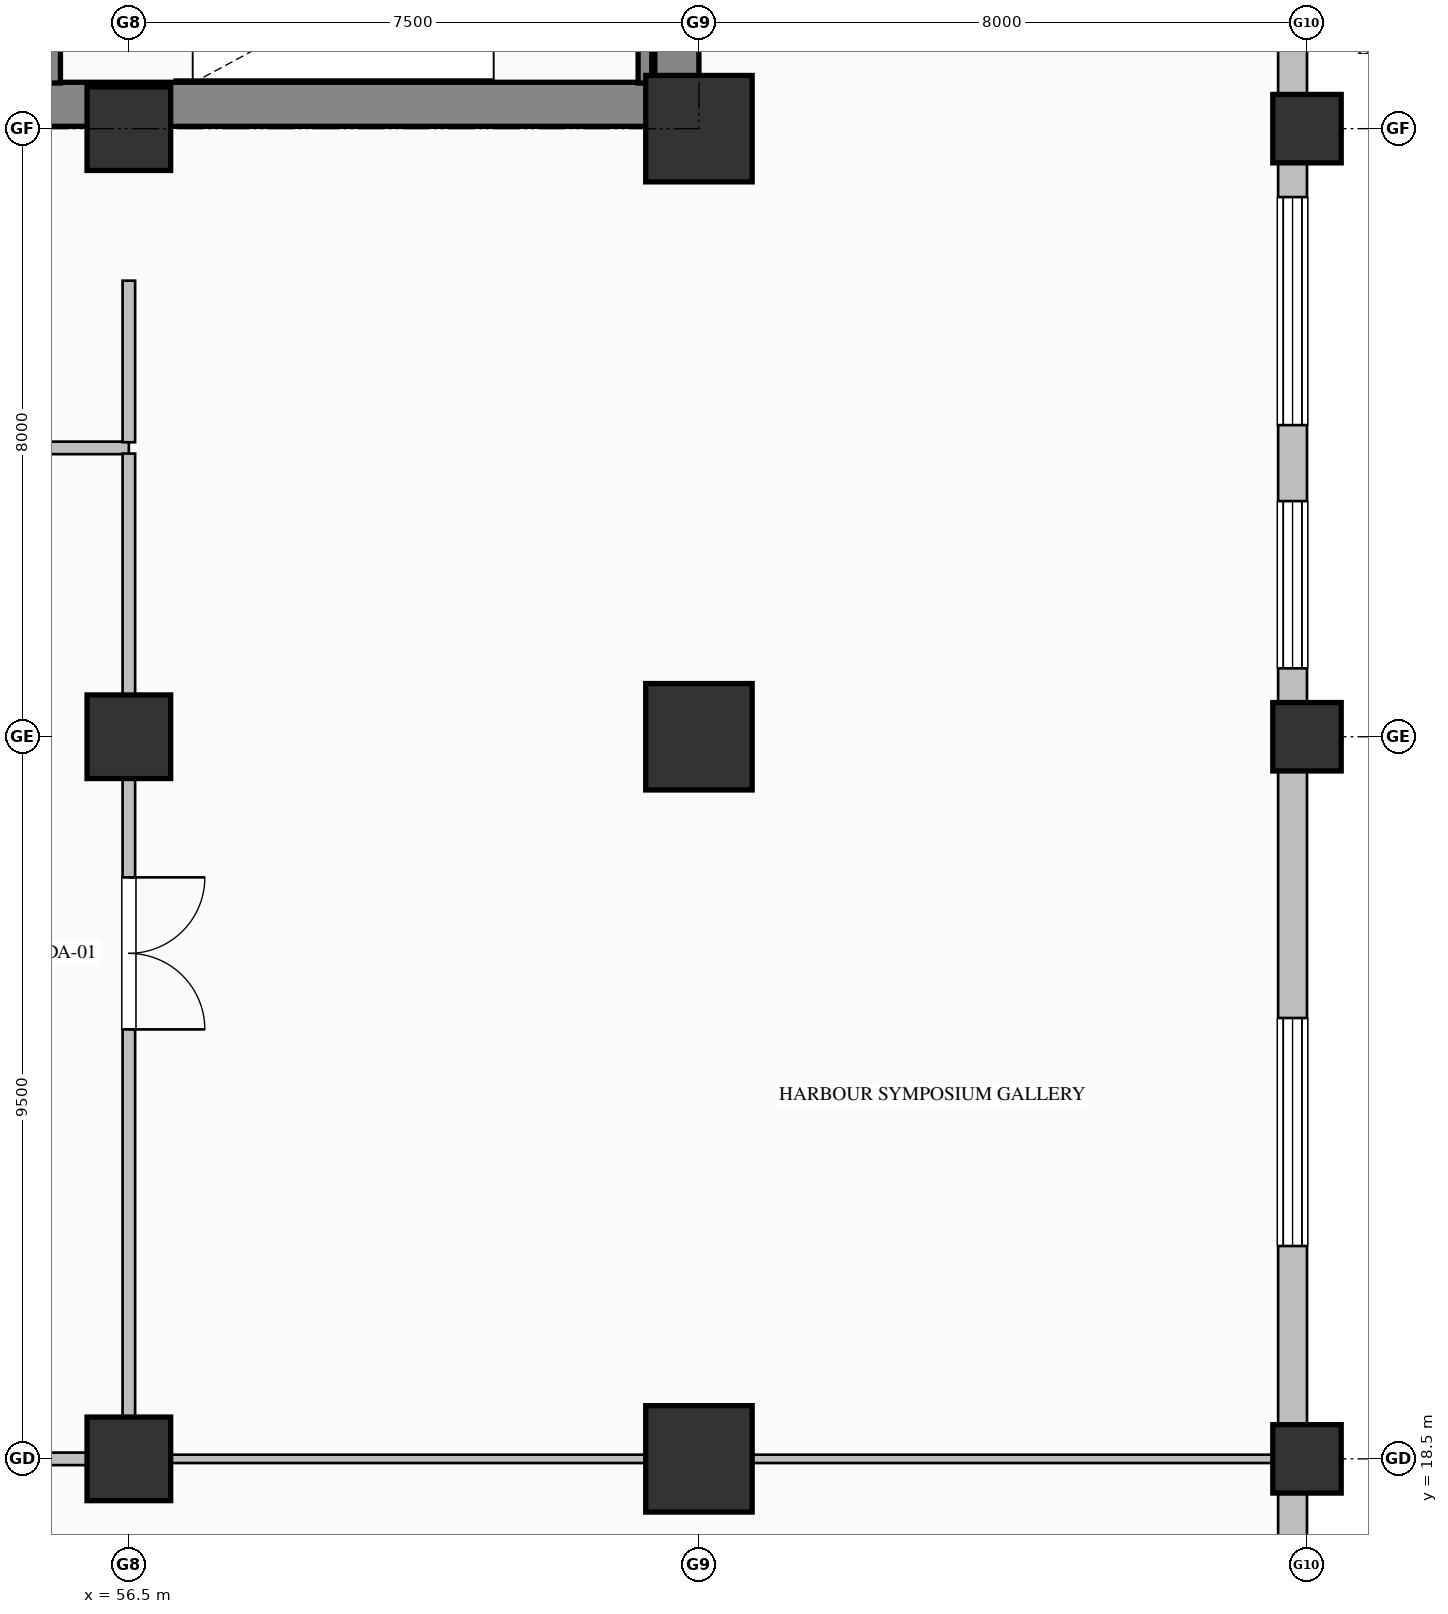
"""IFC4 building model, lengths in metres.
Left out: names, types, materials, properties, quantities, classifications, styles, units other than length and angle.
Written with IfcOpenShell. Run it as: python <this file> out.ifc"""

import sys

from ifc_helpers import new_model, si_unit, direction, frame, frame_2d, origin, origin_2d, place, context, subcontext, project, spatial, rectangle, hollow_rectangle, extrude, element, fill, save


model = new_model("IFC4")
c1 = context("Model", 3, precision=1e-05, world=origin(), true_north=direction((0.0, 1.0)))
c2 = subcontext(c1, "Body", "Model", "MODEL_VIEW")
j1 = project(units=[si_unit("LENGTHUNIT", "METRE"), si_unit("PLANEANGLEUNIT", "RADIAN")], contexts=[c1])
p1 = place(None, origin())
s1 = spatial("IfcSite", under=j1, at=p1, CompositionType="ELEMENT")
p2 = place(p1, origin())
s2 = spatial("IfcBuilding", under=s1, at=p2, CompositionType="ELEMENT")
p3 = place(p2, frame((0.0, 0.0, 11.4)))
s3 = spatial("IfcBuildingStorey", under=s2, at=p3, CompositionType="ELEMENT", Elevation=11.4)
p4 = place(p3, frame((63.71, 36.32, 0.0), z_axis=(0.0, 0.0, 1.0), x_axis=(0.0, 1.0, 0.0)))
e1 = element("IfcWall", 1, at=p4, inside=s3, PredefinedType="SHEAR", context=c2, shape_type="SweptSolid", body=[
    extrude(rectangle(XDim=15.1, YDim=0.58, at=frame_2d((7.55, 0.0))), origin(), (0.0, 0.0, 1.0), 5.55),
])
p5 = place(p3, frame((54.4, 36.32, 0.0), z_axis=(0.0, 0.0, 1.0), x_axis=(1.0, 0.0, 0.0)))
e2 = element("IfcWall", 2, at=p5, inside=s3, PredefinedType="SHEAR", context=c2, shape_type="SweptSolid", body=[
    extrude(rectangle(XDim=9.6, YDim=0.58, at=frame_2d((4.8, 0.0))), origin(), (0.0, 0.0, 1.0), 6.0),
])
for number, where, z_axis, x_axis in (
    (3, (56.5, 18.5, 0.0), (0.0, 0.0, 1.0), (1.0, 0.0, 0.0)),
    (4, (56.5, 28.0, 0.0), (0.0, 0.0, 1.0), (1.0, 0.0, 0.0)),
    (5, (56.5, 36.0, 0.0), (0.0, 0.0, 1.0), (1.0, 0.0, 0.0)),
):
    element("IfcColumn", number, at=place(p3, frame(where, z_axis=z_axis, x_axis=x_axis)), inside=s3, PredefinedType="COLUMN", context=c2, shape_type="SweptSolid", body=[
        extrude(rectangle(XDim=1.1, YDim=1.1, at=origin_2d()), origin(), (0.0, 0.0, 1.0), 6.0),
    ])
for number, where, z_axis, x_axis in (
    (6, (64.0, 18.5, 0.0), (0.0, 0.0, 1.0), (1.0, 0.0, 0.0)),
    (7, (64.0, 28.0, 0.0), (0.0, 0.0, 1.0), (1.0, 0.0, 0.0)),
    (8, (64.0, 36.0, 0.0), (0.0, 0.0, 1.0), (1.0, 0.0, 0.0)),
):
    element("IfcColumn", number, at=place(p3, frame(where, z_axis=z_axis, x_axis=x_axis)), inside=s3, PredefinedType="COLUMN", context=c2, shape_type="SweptSolid", body=[
        extrude(hollow_rectangle(XDim=1.4, YDim=1.4, WallThickness=0.05, at=origin_2d()), origin(), (0.0, 0.0, 1.0), 6.0),
    ])
for number, where, z_axis, x_axis in (
    (9, (72.0, 18.5, 0.0), (0.0, 0.0, 1.0), (1.0, 0.0, 0.0)),
    (10, (72.0, 28.0, 0.0), (0.0, 0.0, 1.0), (1.0, 0.0, 0.0)),
    (11, (72.0, 36.0, 0.0), (0.0, 0.0, 1.0), (1.0, 0.0, 0.0)),
):
    element("IfcColumn", number, at=place(p3, frame(where, z_axis=z_axis, x_axis=x_axis)), inside=s3, PredefinedType="PILASTER", context=c2, shape_type="SweptSolid", body=[
        extrude(rectangle(XDim=0.9, YDim=0.9, at=origin_2d()), origin(), (0.0, 0.0, 1.0), 6.0),
    ])
p6 = place(p3, frame((71.81, 48.0, 0.0), z_axis=(0.0, 0.0, 1.0), x_axis=(0.0, -1.0, 0.0)))
e12 = element("IfcWall", 12, at=p6, inside=s3, PredefinedType="SOLIDWALL", context=c2, shape_type="SweptSolid", body=[
    extrude(rectangle(XDim=44.0, YDim=0.38, at=frame_2d((22.0, 0.0))), origin(), (0.0, 0.0, 1.0), 5.05),
])
p7 = place(p6, frame((6.1, 0.0, 0.9)))
e13 = element("IfcOpeningElement", 13, at=p7, cuts=e12, PredefinedType="OPENING", context=c2, shape_type="SweptSolid", body=[
    extrude(rectangle(XDim=2.2, YDim=2.65, at=frame_2d((1.1, 1.325))), frame((0.0, 0.2, 0.0), z_axis=(0.0, -1.0, 0.0), x_axis=(1.0, 0.0, 0.0)), (0.0, 0.0, 1.0), 0.4),
])
p8 = place(p6, frame((12.9, 0.0, 0.85)))
e14 = element("IfcOpeningElement", 14, at=p8, cuts=e12, PredefinedType="OPENING", context=c2, shape_type="SweptSolid", body=[
    extrude(rectangle(XDim=3.0, YDim=3.2, at=frame_2d((1.5, 1.6))), frame((0.0, 0.2, 0.0), z_axis=(0.0, -1.0, 0.0), x_axis=(1.0, 0.0, 0.0)), (0.0, 0.0, 1.0), 0.4),
])
p9 = place(p6, frame((16.9, 0.0, 0.9)))
e15 = element("IfcOpeningElement", 15, at=p9, cuts=e12, PredefinedType="OPENING", context=c2, shape_type="SweptSolid", body=[
    extrude(rectangle(XDim=2.2, YDim=2.65, at=frame_2d((1.1, 1.325))), frame((0.0, 0.2, 0.0), z_axis=(0.0, -1.0, 0.0), x_axis=(1.0, 0.0, 0.0)), (0.0, 0.0, 1.0), 0.4),
])
p10 = place(p6, frame((23.7, 0.0, 0.85)))
e16 = element("IfcOpeningElement", 16, at=p10, cuts=e12, PredefinedType="OPENING", context=c2, shape_type="SweptSolid", body=[
    extrude(rectangle(XDim=3.0, YDim=3.2, at=frame_2d((1.5, 1.6))), frame((0.0, 0.2, 0.0), z_axis=(0.0, -1.0, 0.0), x_axis=(1.0, 0.0, 0.0)), (0.0, 0.0, 1.0), 0.4),
])
p11 = place(p6, frame((31.1, 0.0, 0.85)))
e17 = element("IfcOpeningElement", 17, at=p11, cuts=e12, PredefinedType="OPENING", context=c2, shape_type="SweptSolid", body=[
    extrude(rectangle(XDim=2.6, YDim=3.1, at=frame_2d((1.3, 1.55))), frame((0.0, 0.2, 0.0), z_axis=(0.0, -1.0, 0.0), x_axis=(1.0, 0.0, 0.0)), (0.0, 0.0, 1.0), 0.4),
])
p12 = place(p6, frame((38.5, 0.0, 0.9)))
e18 = element("IfcOpeningElement", 18, at=p12, cuts=e12, PredefinedType="OPENING", context=c2, shape_type="SweptSolid", body=[
    extrude(rectangle(XDim=2.2, YDim=2.65, at=frame_2d((1.1, 1.325))), frame((0.0, 0.2, 0.0), z_axis=(0.0, -1.0, 0.0), x_axis=(1.0, 0.0, 0.0)), (0.0, 0.0, 1.0), 0.4),
])
p13 = place(p3, frame((55.48, 39.75, 0.0), z_axis=(0.0, 0.0, 1.0), x_axis=(0.0, -1.0, 0.0)))
e19 = element("IfcWall", 19, at=p13, inside=s3, PredefinedType="SOLIDWALL", context=c2, shape_type="SweptSolid", body=[
    extrude(rectangle(XDim=3.15, YDim=0.24, at=frame_2d((1.575, 0.0))), origin(), (0.0, 0.0, 1.0), 6.0),
])
p14 = place(p13, frame((1.0, 0.0, 0.0)))
e20 = element("IfcOpeningElement", 20, at=p14, cuts=e19, PredefinedType="OPENING", context=c2, shape_type="SweptSolid", body=[
    extrude(rectangle(XDim=1.15, YDim=2.2, at=frame_2d((0.575, 1.1))), frame((0.0, 0.13, 0.0), z_axis=(0.0, -1.0, 0.0), x_axis=(1.0, 0.0, 0.0)), (0.0, 0.0, 1.0), 0.26),
])
p15 = place(p3, frame((63.29, 36.6, 0.0), z_axis=(0.0, 0.0, 1.0), x_axis=(0.0, 1.0, 0.0)))
e21 = element("IfcWall", 21, at=p15, inside=s3, PredefinedType="SOLIDWALL", context=c2, shape_type="SweptSolid", body=[
    extrude(rectangle(XDim=3.15, YDim=0.18, at=frame_2d((1.575, 0.0))), origin(), (0.0, 0.0, 1.0), 6.0),
])
p16 = place(p3, frame((56.5, 31.8, 0.0), z_axis=(0.0, 0.0, 1.0), x_axis=(-1.0, 0.0, 0.0)))
e22 = element("IfcWall", 22, at=p16, inside=s3, PredefinedType="PARTITIONING", context=c2, shape_type="SweptSolid", body=[
    extrude(rectangle(XDim=24.0, YDim=0.165, at=frame_2d((12.0, 0.0))), origin(), (0.0, 0.0, 1.0), 5.55),
])
p17 = place(p16, frame((11.475, 0.0, 0.0)))
e23 = element("IfcOpeningElement", 23, at=p17, cuts=e22, PredefinedType="OPENING", context=c2, shape_type="SweptSolid", body=[
    extrude(rectangle(XDim=1.05, YDim=2.15, at=frame_2d((0.525, 1.075))), frame((0.0, 0.093, 0.0), z_axis=(0.0, -1.0, 0.0), x_axis=(1.0, 0.0, 0.0)), (0.0, 0.0, 1.0), 0.185),
])
p18 = place(p3, frame((56.5, 34.0, 0.0), z_axis=(0.0, 0.0, 1.0), x_axis=(0.0, -1.0, 0.0)))
e24 = element("IfcWall", 24, at=p18, inside=s3, PredefinedType="PARTITIONING", context=c2, shape_type="SweptSolid", body=[
    extrude(rectangle(XDim=2.125, YDim=0.165, at=frame_2d((1.063, 0.0))), origin(), (0.0, 0.0, 1.0), 4.642),
])
p19 = place(p3, frame((56.5, 31.726, 0.0), z_axis=(0.0, 0.0, 1.0), x_axis=(0.0, -1.0, 0.0)))
e25 = element("IfcWall", 25, at=p19, inside=s3, PredefinedType="PARTITIONING", context=c2, shape_type="SweptSolid", body=[
    extrude(rectangle(XDim=13.151, YDim=0.165, at=frame_2d((6.576, 0.0))), origin(), (0.0, 0.0, 1.0), 4.642),
])
p20 = place(p19, frame((5.575, 0.0, 0.0)))
e26 = element("IfcOpeningElement", 26, at=p20, cuts=e25, PredefinedType="OPENING", context=c2, shape_type="SweptSolid", body=[
    extrude(rectangle(XDim=2.0, YDim=2.4, at=frame_2d((1.0, 1.2))), frame((0.0, 0.093, 0.0), z_axis=(0.0, -1.0, 0.0), x_axis=(1.0, 0.0, 0.0)), (0.0, 0.0, 1.0), 0.185),
])
p21 = place(p3, frame((56.5, 18.5, 0.0), z_axis=(0.0, 0.0, 1.0), x_axis=(-1.0, 0.0, 0.0)))
e27 = element("IfcWall", 27, at=p21, inside=s3, PredefinedType="PARTITIONING", context=c2, shape_type="SweptSolid", body=[
    extrude(rectangle(XDim=8.0, YDim=0.165, at=frame_2d((4.0, 0.0))), origin(), (0.0, 0.0, 1.0), 4.642),
])
p22 = place(p21, frame((3.45, 0.0, 0.0)))
e28 = element("IfcOpeningElement", 28, at=p22, cuts=e27, PredefinedType="OPENING", context=c2, shape_type="SweptSolid", body=[
    extrude(rectangle(XDim=1.1, YDim=2.2, at=frame_2d((0.55, 1.1))), frame((0.0, 0.093, 0.0), z_axis=(0.0, -1.0, 0.0), x_axis=(1.0, 0.0, 0.0)), (0.0, 0.0, 1.0), 0.185),
])
p23 = place(p3, frame((71.628, 18.5, 0.0), z_axis=(0.0, 0.0, 1.0), x_axis=(-1.0, 0.0, 0.0)))
e29 = element("IfcWall", 29, at=p23, inside=s3, PredefinedType="MOVABLE", context=c2, shape_type="SweptSolid", body=[
    extrude(rectangle(XDim=15.128, YDim=0.11, at=frame_2d((7.564, 0.0))), origin(), (0.0, 0.0, 1.0), 4.642),
])
p24 = place(p8, origin())
e30 = element("IfcWindow", 30, at=p24, inside=s3, PartitioningType="TRIPLE_PANEL_VERTICAL", PredefinedType="WINDOW", context=c2, shape_type="SweptSolid", body=[
    extrude(rectangle(XDim=3.0, YDim=3.2, at=frame_2d((1.5, 1.6))), frame((0.0, 0.15, 0.0), z_axis=(0.0, -1.0, 0.0), x_axis=(1.0, 0.0, 0.0)), (0.0, 0.0, 1.0), 0.06),
])
fill(e14, e30)
p25 = place(p9, origin())
e31 = element("IfcWindow", 31, at=p25, inside=s3, PartitioningType="TRIPLE_PANEL_VERTICAL", PredefinedType="WINDOW", context=c2, shape_type="SweptSolid", body=[
    extrude(rectangle(XDim=2.2, YDim=2.65, at=frame_2d((1.1, 1.325))), frame((0.0, 0.15, 0.0), z_axis=(0.0, -1.0, 0.0), x_axis=(1.0, 0.0, 0.0)), (0.0, 0.0, 1.0), 0.06),
])
fill(e15, e31)
p26 = place(p10, origin())
e32 = element("IfcWindow", 32, at=p26, inside=s3, PartitioningType="TRIPLE_PANEL_VERTICAL", PredefinedType="WINDOW", context=c2, shape_type="SweptSolid", body=[
    extrude(rectangle(XDim=3.0, YDim=3.2, at=frame_2d((1.5, 1.6))), frame((0.0, 0.15, 0.0), z_axis=(0.0, -1.0, 0.0), x_axis=(1.0, 0.0, 0.0)), (0.0, 0.0, 1.0), 0.06),
])
fill(e16, e32)
p27 = place(p20, origin())
e33 = element("IfcDoor", 33, at=p27, inside=s3, OperationType="DOUBLE_DOOR_SINGLE_SWING", PredefinedType="DOOR", context=c2, shape_type="SweptSolid", body=[
    extrude(rectangle(XDim=2.0, YDim=2.4, at=frame_2d((1.0, 1.2))), frame((0.0, 0.025, 0.0), z_axis=(0.0, -1.0, 0.0), x_axis=(1.0, 0.0, 0.0)), (0.0, 0.0, 1.0), 0.05),
])
fill(e26, e33)
save(model, sys.argv[1])
